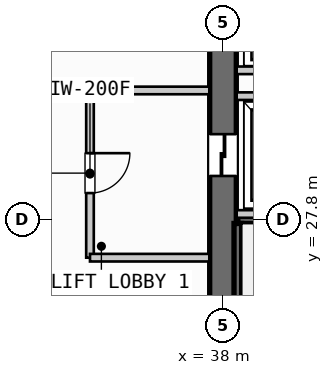
"""IFC4 building model, lengths in metres.
Left out: names, types, materials, properties, quantities, classifications, styles, units other than length and angle.
Written with IfcOpenShell. Run it as: python <this file> out.ifc"""

import sys

from ifc_helpers import new_model, si_unit, direction, frame, frame_2d, origin, place, context, subcontext, project, spatial, rectangle, extrude, source, transform, mapped, element, fill, save


model = new_model("IFC4")
c1 = context("Model", 3, precision=1e-05, world=origin(), true_north=direction((0.0, 1.0)))
c2 = subcontext(c1, "Body", "Model", "MODEL_VIEW")
j1 = project(units=[si_unit("LENGTHUNIT", "METRE"), si_unit("PLANEANGLEUNIT", "RADIAN")], contexts=[c1])
p1 = place(None, origin())
s1 = spatial("IfcSite", under=j1, at=p1, CompositionType="ELEMENT")
p2 = place(p1, origin())
s2 = spatial("IfcBuilding", under=s1, at=p2, CompositionType="ELEMENT")
p3 = place(p2, frame((0.0, 0.0, 19.6)))
s3 = spatial("IfcBuildingStorey", under=s2, at=p3, CompositionType="ELEMENT", Elevation=19.6)
p4 = place(p3, frame((38.0, 35.26, 0.0), z_axis=(0.0, 0.0, 1.0), x_axis=(0.0, -1.0, 0.0)))
e1 = element("IfcWall", 1, at=p4, inside=s3, PredefinedType="SHEAR", context=c2, shape_type="SweptSolid", body=[
    extrude(rectangle(XDim=14.92, YDim=0.7, at=frame_2d((7.46, 0.0))), origin(), (0.0, 0.0, 1.0), 4.08),
])
p5 = place(p4, frame((5.21, 0.0, 0.0)))
e2 = element("IfcOpeningElement", 2, at=p5, cuts=e1, PredefinedType="OPENING", context=c2, shape_type="SweptSolid", body=[
    extrude(rectangle(XDim=1.1, YDim=2.2, at=frame_2d((0.55, 1.1))), frame((0.0, 0.36, 0.0), z_axis=(0.0, -1.0, 0.0), x_axis=(1.0, 0.0, 0.0)), (0.0, 0.0, 1.0), 0.72),
])
p6 = place(p3, frame((38.39, 27.8, 0.0), z_axis=(0.0, 0.0, 1.0), x_axis=(1.0, 0.0, 0.0)))
e3 = element("IfcWall", 3, at=p6, inside=s3, PredefinedType="SHEAR", context=c2, shape_type="SweptSolid", body=[
    extrude(rectangle(XDim=3.06, YDim=0.2, at=frame_2d((1.53, 0.0))), origin(), (0.0, 0.0, 1.0), 4.08),
])
p7 = place(p3, frame((38.39, 20.35, 0.0), z_axis=(0.0, 0.0, 1.0), x_axis=(0.0, 1.0, 0.0)))
e4 = element("IfcWall", 4, at=p7, inside=s3, PredefinedType="SHEAR", context=c2, shape_type="SweptSolid", body=[
    extrude(rectangle(XDim=7.35, YDim=0.2, at=frame_2d((3.675, 0.0))), origin(), (0.0, 0.0, 1.0), 4.08),
])
for number, where, z_axis, x_axis in (
    (5, (38.36, 27.95, 0.0), (0.0, 0.0, 1.0), (1.0, 0.0, 0.0)),
    (6, (38.36, 31.05, 0.0), (0.0, 0.0, 1.0), (1.0, 0.0, 0.0)),
):
    element("IfcWall", number, at=place(p3, frame(where, z_axis=z_axis, x_axis=x_axis)), inside=s3, PredefinedType="PARTITIONING", context=c2, shape_type="SweptSolid", body=[
        extrude(rectangle(XDim=2.79, YDim=0.2, at=frame_2d((1.395, 0.0))), origin(), (0.0, 0.0, 1.0), 3.293),
    ])
p8 = place(p3, frame((34.5, 31.2, 0.0), z_axis=(0.0, 0.0, 1.0), x_axis=(0.0, -1.0, 0.0)))
e7 = element("IfcWall", 7, at=p8, inside=s3, PredefinedType="PARTITIONING", context=c2, shape_type="SweptSolid", body=[
    extrude(rectangle(XDim=4.4, YDim=0.2, at=frame_2d((2.2, 0.0))), origin(), (0.0, 0.0, 1.0), 3.293),
])
p9 = place(p8, frame((1.65, 0.0, 0.0)))
e8 = element("IfcOpeningElement", 8, at=p9, cuts=e7, PredefinedType="OPENING", context=c2, shape_type="SweptSolid", body=[
    extrude(rectangle(XDim=1.05, YDim=2.15, at=frame_2d((0.525, 1.075))), frame((0.0, 0.11, 0.0), z_axis=(0.0, -1.0, 0.0), x_axis=(1.0, 0.0, 0.0)), (0.0, 0.0, 1.0), 0.22),
])
for number, where, z_axis, x_axis in (
    (9, (34.5, 26.8, 0.0), (0.0, 0.0, 1.0), (1.0, 0.0, 0.0)),
    (10, (34.5, 31.2, 0.0), (0.0, 0.0, 1.0), (1.0, 0.0, 0.0)),
):
    element("IfcWall", number, at=place(p3, frame(where, z_axis=z_axis, x_axis=x_axis)), inside=s3, PredefinedType="PARTITIONING", context=c2, shape_type="SweptSolid", body=[
        extrude(rectangle(XDim=3.14, YDim=0.2, at=frame_2d((1.57, 0.0))), origin(), (0.0, 0.0, 1.0), 3.293),
    ])
p10 = place(p3, frame((38.36, 31.73, 0.0), z_axis=(0.0, 0.0, 1.0), x_axis=(1.0, 0.0, 0.0)))
e11 = element("IfcWall", 11, at=p10, inside=s3, PredefinedType="PARTITIONING", context=c2, shape_type="SweptSolid", body=[
    extrude(rectangle(XDim=7.44, YDim=0.2, at=frame_2d((3.72, 0.0))), origin(), (0.0, 0.0, 1.0), 3.293),
])
m1 = source(origin(), c2, "Body", "SweptSolid", [
    extrude(rectangle(XDim=1.1, YDim=2.2, at=frame_2d((0.55, 1.1))), frame((0.0, 0.025, 0.0), z_axis=(0.0, -1.0, 0.0), x_axis=(1.0, 0.0, 0.0)), (0.0, 0.0, 1.0), 0.05),
])
p11 = place(p5, origin())
e12 = element("IfcDoor", 12, at=p11, inside=s3, OperationType="SLIDING_TO_LEFT", PredefinedType="DOOR", context=c2, shape_type="MappedRepresentation", body=[
    mapped(m1, transform((0.0, 0.0, 0.0), scale=1.0)),
])
fill(e2, e12)
m2 = source(origin(), c2, "Body", "SweptSolid", [
    extrude(rectangle(XDim=1.05, YDim=2.15, at=frame_2d((0.525, 1.075))), frame((0.0, 0.025, 0.0), z_axis=(0.0, -1.0, 0.0), x_axis=(1.0, 0.0, 0.0)), (0.0, 0.0, 1.0), 0.05),
])
p12 = place(p9, origin())
e13 = element("IfcDoor", 13, at=p12, inside=s3, OperationType="SINGLE_SWING_LEFT", PredefinedType="DOOR", context=c2, shape_type="MappedRepresentation", body=[
    mapped(m2, transform((0.0, 0.0, 0.0), scale=1.0)),
])
fill(e8, e13)
save(model, sys.argv[1])
